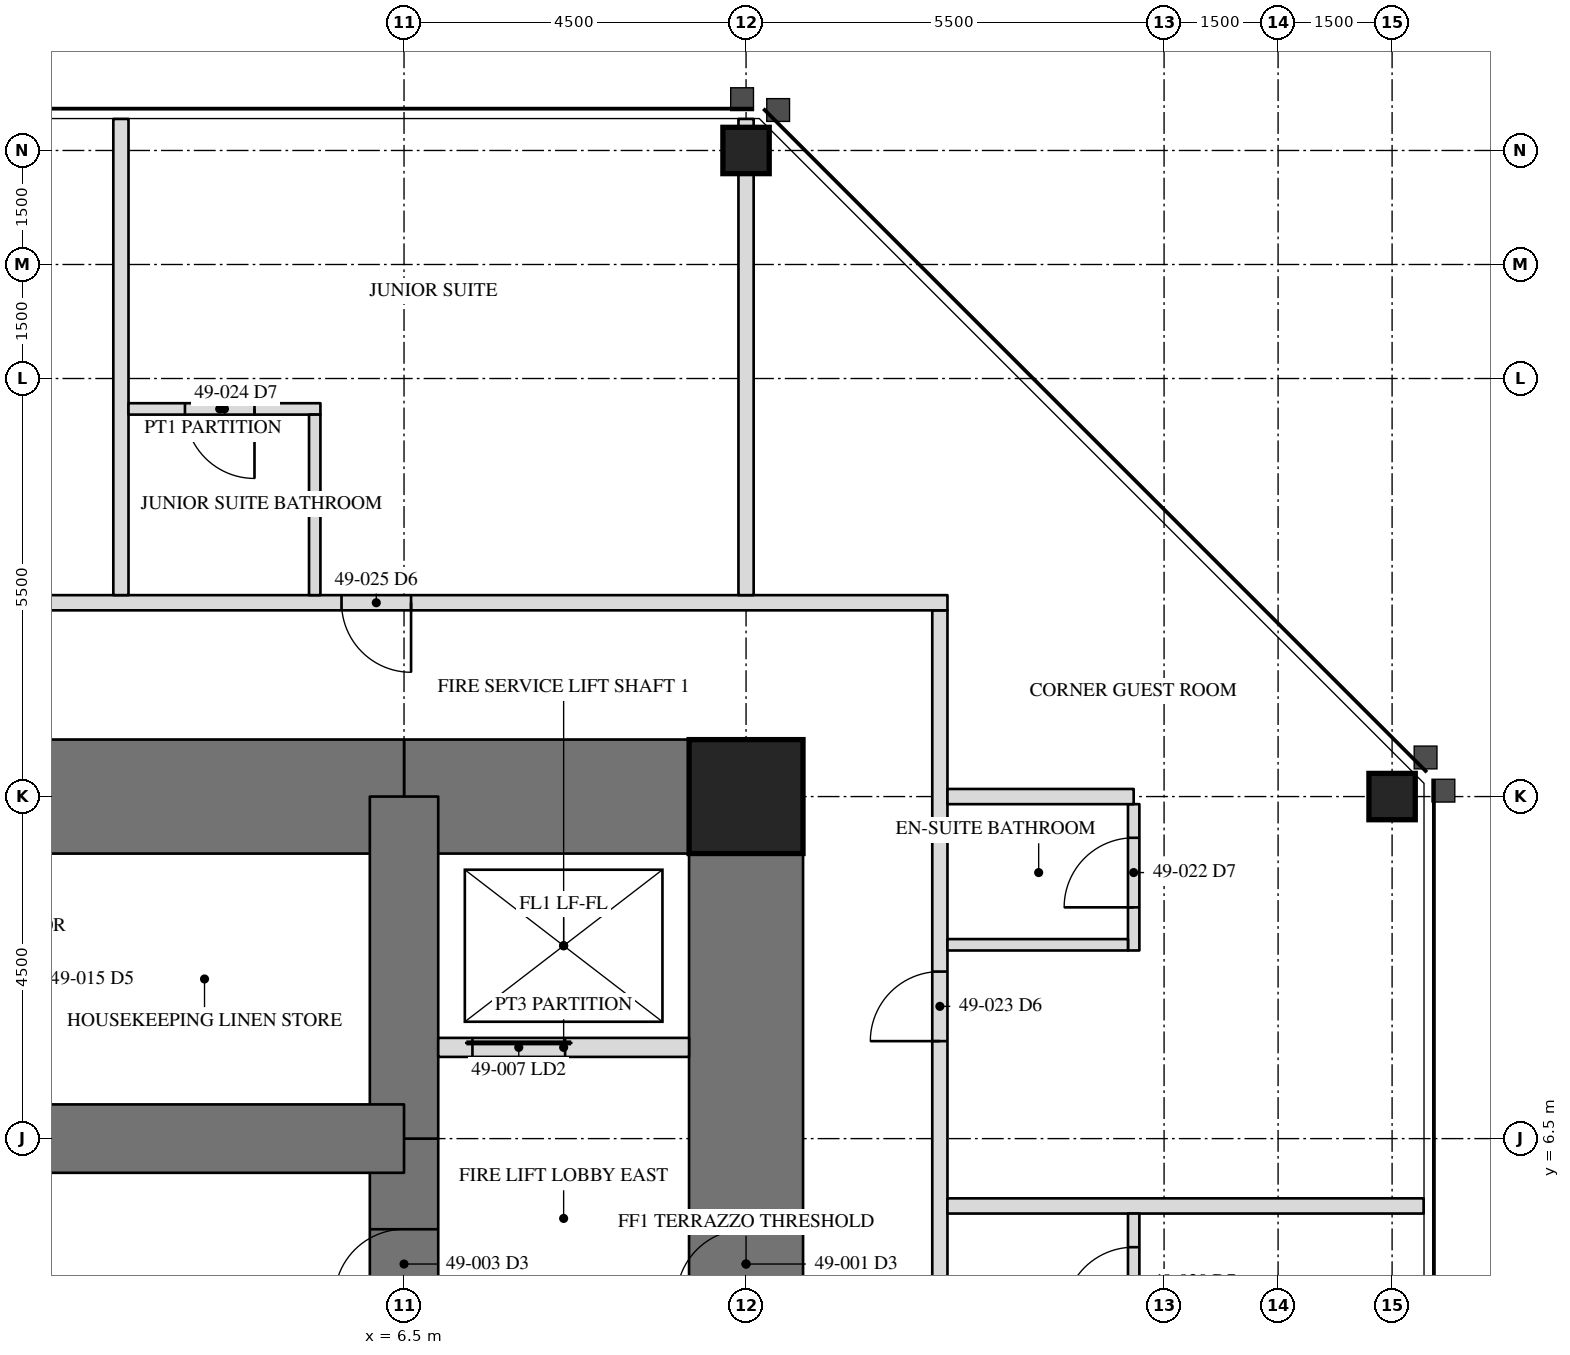
"""IFC4 building model, lengths in metres.
Left out: names, types, materials, properties, quantities, classifications, styles, units other than length and angle.
Written with IfcOpenShell. Run it as: python <this file> out.ifc"""

import sys

from ifc_helpers import new_model, si_unit, direction, frame, frame_2d, origin, origin_2d, place, context, subcontext, project, spatial, rectangle, hollow_rectangle, extrude, element, fill, save


model = new_model("IFC4")
c1 = context("Model", 3, precision=1e-05, world=origin(), true_north=direction((0.0, 1.0)))
c2 = subcontext(c1, "Body", "Model", "MODEL_VIEW")
j1 = project(units=[si_unit("LENGTHUNIT", "METRE"), si_unit("PLANEANGLEUNIT", "RADIAN")], contexts=[c1])
p1 = place(None, origin())
s1 = spatial("IfcSite", under=j1, at=p1, CompositionType="ELEMENT")
p2 = place(p1, origin())
s2 = spatial("IfcBuilding", under=s1, at=p2, CompositionType="ELEMENT")
p3 = place(p2, frame((0.0, 0.0, 208.2)))
s3 = spatial("IfcBuildingStorey", under=s2, at=p3, CompositionType="ELEMENT", Elevation=208.2)
for number, where, z_axis, x_axis in (
    (1, (19.5, 11.0, 0.0), (0.0, 0.0, 1.0), (0.0, 1.0, 0.0)),
    (2, (11.0, 19.5, 0.0), (0.0, 0.0, 1.0), (1.0, 0.0, 0.0)),
):
    element("IfcColumn", number, at=place(p3, frame(where, z_axis=z_axis, x_axis=x_axis)), inside=s3, PredefinedType="COLUMN", context=c2, shape_type="SweptSolid", body=[
        extrude(hollow_rectangle(XDim=0.61, YDim=0.61, WallThickness=0.076, at=origin_2d()), origin(), (0.0, 0.0, 1.0), 3.5),
    ])
p4 = place(p3, frame((11.0, -11.0, 0.0), z_axis=(0.0, 0.0, 1.0), x_axis=(0.0, 1.0, 0.0)))
e3 = element("IfcWall", 3, at=p4, inside=s3, PredefinedType="SHEAR", context=c2, shape_type="SweptSolid", body=[
    extrude(rectangle(XDim=22.0, YDim=1.5, at=frame_2d((11.0, 0.0))), origin(), (0.0, 0.0, 1.0), 3.5),
])
p5 = place(p4, frame((15.393, 0.0, 0.0)))
e4 = element("IfcOpeningElement", 4, at=p5, cuts=e3, PredefinedType="OPENING", context=c2, shape_type="SweptSolid", body=[
    extrude(rectangle(XDim=0.915, YDim=2.134, at=frame_2d((0.458, 1.067))), frame((0.0, 0.76, 0.0), z_axis=(0.0, -1.0, 0.0), x_axis=(1.0, 0.0, 0.0)), (0.0, 0.0, 1.0), 1.52),
])
p6 = place(p3, frame((11.0, 11.0, 0.0), z_axis=(0.0, 0.0, 1.0), x_axis=(-1.0, 0.0, 0.0)))
e5 = element("IfcWall", 5, at=p6, inside=s3, PredefinedType="SHEAR", context=c2, shape_type="SweptSolid", body=[
    extrude(rectangle(XDim=4.5, YDim=1.5, at=frame_2d((2.25, 0.0))), origin(), (0.0, 0.0, 1.0), 3.5),
])
p7 = place(p3, frame((6.5, 11.0, 0.0), z_axis=(0.0, 0.0, 1.0), x_axis=(-1.0, 0.0, 0.0)))
e6 = element("IfcWall", 6, at=p7, inside=s3, PredefinedType="SHEAR", context=c2, shape_type="SweptSolid", body=[
    extrude(rectangle(XDim=13.0, YDim=1.5, at=frame_2d((6.5, 0.0))), origin(), (0.0, 0.0, 1.0), 3.5),
])
p8 = place(p7, frame((6.042, 0.0, 0.0)))
e7 = element("IfcOpeningElement", 7, at=p8, cuts=e6, PredefinedType="OPENING", context=c2, shape_type="SweptSolid", body=[
    extrude(rectangle(XDim=0.915, YDim=2.134, at=frame_2d((0.458, 1.067))), frame((0.0, 0.76, 0.0), z_axis=(0.0, -1.0, 0.0), x_axis=(1.0, 0.0, 0.0)), (0.0, 0.0, 1.0), 1.52),
])
p9 = place(p3, frame((6.5, -6.5, 0.0), z_axis=(0.0, 0.0, 1.0), x_axis=(0.0, 1.0, 0.0)))
e8 = element("IfcWall", 8, at=p9, inside=s3, PredefinedType="SHEAR", context=c2, shape_type="SweptSolid", body=[
    extrude(rectangle(XDim=13.0, YDim=0.9, at=frame_2d((6.5, 0.0))), origin(), (0.0, 0.0, 1.0), 3.5),
])
p10 = place(p9, frame((10.893, 0.0, 0.0)))
e9 = element("IfcOpeningElement", 9, at=p10, cuts=e8, PredefinedType="OPENING", context=c2, shape_type="SweptSolid", body=[
    extrude(rectangle(XDim=0.915, YDim=2.134, at=frame_2d((0.458, 1.067))), frame((0.0, 0.46, 0.0), z_axis=(0.0, -1.0, 0.0), x_axis=(1.0, 0.0, 0.0)), (0.0, 0.0, 1.0), 0.92),
])
p11 = place(p9, frame((0.61, 0.0, 0.0)))
e10 = element("IfcOpeningElement", 10, at=p11, cuts=e8, PredefinedType="OPENING", context=c2, shape_type="SweptSolid", body=[
    extrude(rectangle(XDim=0.915, YDim=2.134, at=frame_2d((0.458, 1.067))), frame((0.0, 0.46, 0.0), z_axis=(0.0, -1.0, 0.0), x_axis=(1.0, 0.0, 0.0)), (0.0, 0.0, 1.0), 0.92),
])
p12 = place(p3, frame((6.5, 6.5, 0.0), z_axis=(0.0, 0.0, 1.0), x_axis=(0.0, 1.0, 0.0)))
e11 = element("IfcWall", 11, at=p12, inside=s3, PredefinedType="SHEAR", context=c2, shape_type="SweptSolid", body=[
    extrude(rectangle(XDim=4.5, YDim=0.9, at=frame_2d((2.25, 0.0))), origin(), (0.0, 0.0, 1.0), 3.5),
])
p13 = place(p3, frame((6.5, 6.5, 0.0), z_axis=(0.0, 0.0, 1.0), x_axis=(-1.0, 0.0, 0.0)))
e12 = element("IfcWall", 12, at=p13, inside=s3, PredefinedType="SHEAR", context=c2, shape_type="SweptSolid", body=[
    extrude(rectangle(XDim=13.0, YDim=0.9, at=frame_2d((6.5, 0.0))), origin(), (0.0, 0.0, 1.0), 3.5),
])
p14 = place(p3, frame((11.0, 11.0, 0.0), z_axis=(0.0, 0.0, 1.0), x_axis=(1.0, 0.0, 0.0)))
e13 = element("IfcColumn", 13, at=p14, inside=s3, PredefinedType="COLUMN", context=c2, shape_type="SweptSolid", body=[
    extrude(hollow_rectangle(XDim=1.499, YDim=1.499, WallThickness=0.102, at=origin_2d()), origin(), (0.0, 0.0, 1.0), 3.5),
])
p15 = place(p3, frame((6.95, 7.7, 0.0), z_axis=(0.0, 0.0, 1.0), x_axis=(1.0, 0.0, 0.0)))
e14 = element("IfcWall", 14, at=p15, inside=s3, PredefinedType="PARTITIONING", context=c2, shape_type="SweptSolid", body=[
    extrude(rectangle(XDim=3.3, YDim=0.25, at=frame_2d((1.65, 0.0))), origin(), (0.0, 0.0, 1.0), 3.31),
])
p16 = place(p15, frame((0.45, 0.0, 0.0)))
e15 = element("IfcOpeningElement", 15, at=p16, cuts=e14, PredefinedType="OPENING", context=c2, shape_type="SweptSolid", body=[
    extrude(rectangle(XDim=1.219, YDim=2.134, at=frame_2d((0.609, 1.067))), frame((0.0, 0.135, 0.0), z_axis=(0.0, -1.0, 0.0), x_axis=(1.0, 0.0, 0.0)), (0.0, 0.0, 1.0), 0.27),
])
p17 = place(p3, frame((13.55, -13.65, 0.0), z_axis=(0.0, 0.0, 1.0), x_axis=(0.0, 1.0, 0.0)))
e16 = element("IfcWall", 16, at=p17, inside=s3, PredefinedType="PARTITIONING", context=c2, shape_type="SweptSolid", body=[
    extrude(rectangle(XDim=27.1, YDim=0.2, at=frame_2d((13.55, 0.0))), origin(), (0.0, 0.0, 1.0), 3.31),
])
p18 = place(p17, frame((4.283, 0.0, 0.0)))
e17 = element("IfcOpeningElement", 17, at=p18, cuts=e16, PredefinedType="OPENING", context=c2, shape_type="SweptSolid", body=[
    extrude(rectangle(XDim=0.915, YDim=2.134, at=frame_2d((0.458, 1.067))), frame((0.0, 0.11, 0.0), z_axis=(0.0, -1.0, 0.0), x_axis=(1.0, 0.0, 0.0)), (0.0, 0.0, 1.0), 0.22),
])
p19 = place(p17, frame((10.433, 0.0, 0.0)))
e18 = element("IfcOpeningElement", 18, at=p19, cuts=e16, PredefinedType="OPENING", context=c2, shape_type="SweptSolid", body=[
    extrude(rectangle(XDim=0.915, YDim=2.134, at=frame_2d((0.458, 1.067))), frame((0.0, 0.11, 0.0), z_axis=(0.0, -1.0, 0.0), x_axis=(1.0, 0.0, 0.0)), (0.0, 0.0, 1.0), 0.22),
])
p20 = place(p17, frame((16.046, 0.0, 0.0)))
e19 = element("IfcOpeningElement", 19, at=p20, cuts=e16, PredefinedType="OPENING", context=c2, shape_type="SweptSolid", body=[
    extrude(rectangle(XDim=0.915, YDim=2.134, at=frame_2d((0.458, 1.067))), frame((0.0, 0.11, 0.0), z_axis=(0.0, -1.0, 0.0), x_axis=(1.0, 0.0, 0.0)), (0.0, 0.0, 1.0), 0.22),
])
p21 = place(p17, frame((21.433, 0.0, 0.0)))
e20 = element("IfcOpeningElement", 20, at=p21, cuts=e16, PredefinedType="OPENING", context=c2, shape_type="SweptSolid", body=[
    extrude(rectangle(XDim=0.915, YDim=2.134, at=frame_2d((0.458, 1.067))), frame((0.0, 0.11, 0.0), z_axis=(0.0, -1.0, 0.0), x_axis=(1.0, 0.0, 0.0)), (0.0, 0.0, 1.0), 0.22),
])
p22 = place(p3, frame((13.65, 13.55, 0.0), z_axis=(0.0, 0.0, 1.0), x_axis=(-1.0, 0.0, 0.0)))
e21 = element("IfcWall", 21, at=p22, inside=s3, PredefinedType="PARTITIONING", context=c2, shape_type="SweptSolid", body=[
    extrude(rectangle(XDim=27.1, YDim=0.2, at=frame_2d((13.55, 0.0))), origin(), (0.0, 0.0, 1.0), 3.31),
])
p23 = place(p22, frame((7.058, 0.0, 0.0)))
e22 = element("IfcOpeningElement", 22, at=p23, cuts=e21, PredefinedType="OPENING", context=c2, shape_type="SweptSolid", body=[
    extrude(rectangle(XDim=0.915, YDim=2.134, at=frame_2d((0.458, 1.067))), frame((0.0, 0.11, 0.0), z_axis=(0.0, -1.0, 0.0), x_axis=(1.0, 0.0, 0.0)), (0.0, 0.0, 1.0), 0.22),
])
p24 = place(p22, frame((13.24, 0.0, 0.0)))
e23 = element("IfcOpeningElement", 23, at=p24, cuts=e21, PredefinedType="OPENING", context=c2, shape_type="SweptSolid", body=[
    extrude(rectangle(XDim=0.915, YDim=2.134, at=frame_2d((0.458, 1.067))), frame((0.0, 0.11, 0.0), z_axis=(0.0, -1.0, 0.0), x_axis=(1.0, 0.0, 0.0)), (0.0, 0.0, 1.0), 0.22),
])
p25 = place(p22, frame((20.833, 0.0, 0.0)))
e24 = element("IfcOpeningElement", 24, at=p25, cuts=e21, PredefinedType="OPENING", context=c2, shape_type="SweptSolid", body=[
    extrude(rectangle(XDim=0.915, YDim=2.134, at=frame_2d((0.458, 1.067))), frame((0.0, 0.11, 0.0), z_axis=(0.0, -1.0, 0.0), x_axis=(1.0, 0.0, 0.0)), (0.0, 0.0, 1.0), 0.22),
])
p26 = place(p3, frame((13.65, 5.614, 0.0), z_axis=(0.0, 0.0, 1.0), x_axis=(1.0, 0.0, 0.0)))
e25 = element("IfcWall", 25, at=p26, inside=s3, PredefinedType="PARTITIONING", context=c2, shape_type="SweptSolid", body=[
    extrude(rectangle(XDim=6.265, YDim=0.2, at=frame_2d((3.133, 0.0))), origin(), (0.0, 0.0, 1.0), 3.31),
])
p27 = place(p3, frame((16.1, 3.589, 0.0), z_axis=(0.0, 0.0, 1.0), x_axis=(0.0, 1.0, 0.0)))
e26 = element("IfcWall", 26, at=p27, inside=s3, PredefinedType="PARTITIONING", context=c2, shape_type="SweptSolid", body=[
    extrude(rectangle(XDim=1.925, YDim=0.15, at=frame_2d((0.962, 0.0))), origin(), (0.0, 0.0, 1.0), 3.31),
])
p28 = place(p27, frame((0.567, 0.0, 0.0)))
e27 = element("IfcOpeningElement", 27, at=p28, cuts=e26, PredefinedType="OPENING", context=c2, shape_type="SweptSolid", body=[
    extrude(rectangle(XDim=0.915, YDim=2.032, at=frame_2d((0.458, 1.016))), frame((0.0, 0.085, 0.0), z_axis=(0.0, -1.0, 0.0), x_axis=(1.0, 0.0, 0.0)), (0.0, 0.0, 1.0), 0.17),
])
p29 = place(p3, frame((16.1, 8.975, 0.0), z_axis=(0.0, 0.0, 1.0), x_axis=(0.0, 1.0, 0.0)))
e28 = element("IfcWall", 28, at=p29, inside=s3, PredefinedType="PARTITIONING", context=c2, shape_type="SweptSolid", body=[
    extrude(rectangle(XDim=1.925, YDim=0.15, at=frame_2d((0.962, 0.0))), origin(), (0.0, 0.0, 1.0), 3.31),
])
p30 = place(p29, frame((0.567, 0.0, 0.0)))
e29 = element("IfcOpeningElement", 29, at=p30, cuts=e28, PredefinedType="OPENING", context=c2, shape_type="SweptSolid", body=[
    extrude(rectangle(XDim=0.915, YDim=2.032, at=frame_2d((0.458, 1.016))), frame((0.0, 0.085, 0.0), z_axis=(0.0, -1.0, 0.0), x_axis=(1.0, 0.0, 0.0)), (0.0, 0.0, 1.0), 0.17),
])
p31 = place(p3, frame((13.65, 9.05, 0.0), z_axis=(0.0, 0.0, 1.0), x_axis=(1.0, 0.0, 0.0)))
e30 = element("IfcWall", 30, at=p31, inside=s3, PredefinedType="PARTITIONING", context=c2, shape_type="SweptSolid", body=[
    extrude(rectangle(XDim=2.375, YDim=0.15, at=frame_2d((1.188, 0.0))), origin(), (0.0, 0.0, 1.0), 3.31),
])
p32 = place(p3, frame((13.65, 11.0, 0.0), z_axis=(0.0, 0.0, 1.0), x_axis=(1.0, 0.0, 0.0)))
e31 = element("IfcWall", 31, at=p32, inside=s3, PredefinedType="PARTITIONING", context=c2, shape_type="SweptSolid", body=[
    extrude(rectangle(XDim=2.45, YDim=0.2, at=frame_2d((1.225, 0.0))), origin(), (0.0, 0.0, 1.0), 2.802),
])
p33 = place(p3, frame((11.0, 13.65, 0.0), z_axis=(0.0, 0.0, 1.0), x_axis=(0.0, 1.0, 0.0)))
e32 = element("IfcWall", 32, at=p33, inside=s3, PredefinedType="PARTITIONING", context=c2, shape_type="SweptSolid", body=[
    extrude(rectangle(XDim=6.265, YDim=0.2, at=frame_2d((3.133, 0.0))), origin(), (0.0, 0.0, 1.0), 2.802),
])
p34 = place(p3, frame((2.775, 13.65, 0.0), z_axis=(0.0, 0.0, 1.0), x_axis=(0.0, 1.0, 0.0)))
e33 = element("IfcWall", 33, at=p34, inside=s3, PredefinedType="PARTITIONING", context=c2, shape_type="SweptSolid", body=[
    extrude(rectangle(XDim=6.265, YDim=0.2, at=frame_2d((3.133, 0.0))), origin(), (0.0, 0.0, 1.0), 3.31),
])
p35 = place(p3, frame((5.4, 16.1, 0.0), z_axis=(0.0, 0.0, 1.0), x_axis=(-1.0, 0.0, 0.0)))
e34 = element("IfcWall", 34, at=p35, inside=s3, PredefinedType="PARTITIONING", context=c2, shape_type="SweptSolid", body=[
    extrude(rectangle(XDim=2.525, YDim=0.15, at=frame_2d((1.262, 0.0))), origin(), (0.0, 0.0, 1.0), 3.31),
])
p36 = place(p35, frame((0.867, 0.0, 0.0)))
e35 = element("IfcOpeningElement", 35, at=p36, cuts=e34, PredefinedType="OPENING", context=c2, shape_type="SweptSolid", body=[
    extrude(rectangle(XDim=0.915, YDim=2.032, at=frame_2d((0.458, 1.016))), frame((0.0, 0.085, 0.0), z_axis=(0.0, -1.0, 0.0), x_axis=(1.0, 0.0, 0.0)), (0.0, 0.0, 1.0), 0.17),
])
p37 = place(p3, frame((5.325, 13.65, 0.0), z_axis=(0.0, 0.0, 1.0), x_axis=(0.0, 1.0, 0.0)))
e36 = element("IfcWall", 36, at=p37, inside=s3, PredefinedType="PARTITIONING", context=c2, shape_type="SweptSolid", body=[
    extrude(rectangle(XDim=2.375, YDim=0.15, at=frame_2d((1.188, 0.0))), origin(), (0.0, 0.0, 1.0), 3.31),
])
p38 = place(p5, origin())
e37 = element("IfcDoor", 37, at=p38, inside=s3, OperationType="SINGLE_SWING_RIGHT", PredefinedType="DOOR", context=c2, shape_type="SweptSolid", body=[
    extrude(rectangle(XDim=0.915, YDim=2.134, at=frame_2d((0.458, 1.067))), frame((0.0, -0.675, 0.0), z_axis=(0.0, -1.0, 0.0), x_axis=(1.0, 0.0, 0.0)), (0.0, 0.0, 1.0), 0.05),
])
fill(e4, e37)
p39 = place(p10, origin())
e38 = element("IfcDoor", 38, at=p39, inside=s3, OperationType="SINGLE_SWING_RIGHT", PredefinedType="DOOR", context=c2, shape_type="SweptSolid", body=[
    extrude(rectangle(XDim=0.915, YDim=2.134, at=frame_2d((0.458, 1.067))), frame((0.0, -0.375, 0.0), z_axis=(0.0, -1.0, 0.0), x_axis=(1.0, 0.0, 0.0)), (0.0, 0.0, 1.0), 0.05),
])
fill(e9, e38)
p40 = place(p16, origin())
e39 = element("IfcDoor", 39, at=p40, inside=s3, OperationType="SLIDING_TO_LEFT", PredefinedType="DOOR", context=c2, shape_type="SweptSolid", body=[
    extrude(rectangle(XDim=1.219, YDim=2.134, at=frame_2d((0.609, 1.067))), frame((0.0, 0.025, 0.0), z_axis=(0.0, -1.0, 0.0), x_axis=(1.0, 0.0, 0.0)), (0.0, 0.0, 1.0), 0.05),
])
fill(e15, e39)
p41 = place(p28, origin())
e40 = element("IfcDoor", 40, at=p41, inside=s3, OperationType="SINGLE_SWING_LEFT", PredefinedType="DOOR", context=c2, shape_type="SweptSolid", body=[
    extrude(rectangle(XDim=0.915, YDim=2.032, at=frame_2d((0.458, 1.016))), frame((0.0, 0.025, 0.0), z_axis=(0.0, -1.0, 0.0), x_axis=(1.0, 0.0, 0.0)), (0.0, 0.0, 1.0), 0.05),
])
fill(e27, e40)
p42 = place(p30, origin())
e41 = element("IfcDoor", 41, at=p42, inside=s3, OperationType="SINGLE_SWING_LEFT", PredefinedType="DOOR", context=c2, shape_type="SweptSolid", body=[
    extrude(rectangle(XDim=0.915, YDim=2.032, at=frame_2d((0.458, 1.016))), frame((0.0, 0.025, 0.0), z_axis=(0.0, -1.0, 0.0), x_axis=(1.0, 0.0, 0.0)), (0.0, 0.0, 1.0), 0.05),
])
fill(e29, e41)
p43 = place(p21, origin())
e42 = element("IfcDoor", 42, at=p43, inside=s3, OperationType="SINGLE_SWING_LEFT", PredefinedType="DOOR", context=c2, shape_type="SweptSolid", body=[
    extrude(rectangle(XDim=0.915, YDim=2.134, at=frame_2d((0.458, 1.067))), frame((0.0, 0.025, 0.0), z_axis=(0.0, -1.0, 0.0), x_axis=(1.0, 0.0, 0.0)), (0.0, 0.0, 1.0), 0.05),
])
fill(e20, e42)
p44 = place(p36, origin())
e43 = element("IfcDoor", 43, at=p44, inside=s3, OperationType="SINGLE_SWING_LEFT", PredefinedType="DOOR", context=c2, shape_type="SweptSolid", body=[
    extrude(rectangle(XDim=0.915, YDim=2.032, at=frame_2d((0.458, 1.016))), frame((0.0, 0.025, 0.0), z_axis=(0.0, -1.0, 0.0), x_axis=(1.0, 0.0, 0.0)), (0.0, 0.0, 1.0), 0.05),
])
fill(e35, e43)
p45 = place(p23, origin())
e44 = element("IfcDoor", 44, at=p45, inside=s3, OperationType="SINGLE_SWING_LEFT", PredefinedType="DOOR", context=c2, shape_type="SweptSolid", body=[
    extrude(rectangle(XDim=0.915, YDim=2.134, at=frame_2d((0.458, 1.067))), frame((0.0, 0.025, 0.0), z_axis=(0.0, -1.0, 0.0), x_axis=(1.0, 0.0, 0.0)), (0.0, 0.0, 1.0), 0.05),
])
fill(e22, e44)
save(model, sys.argv[1])
